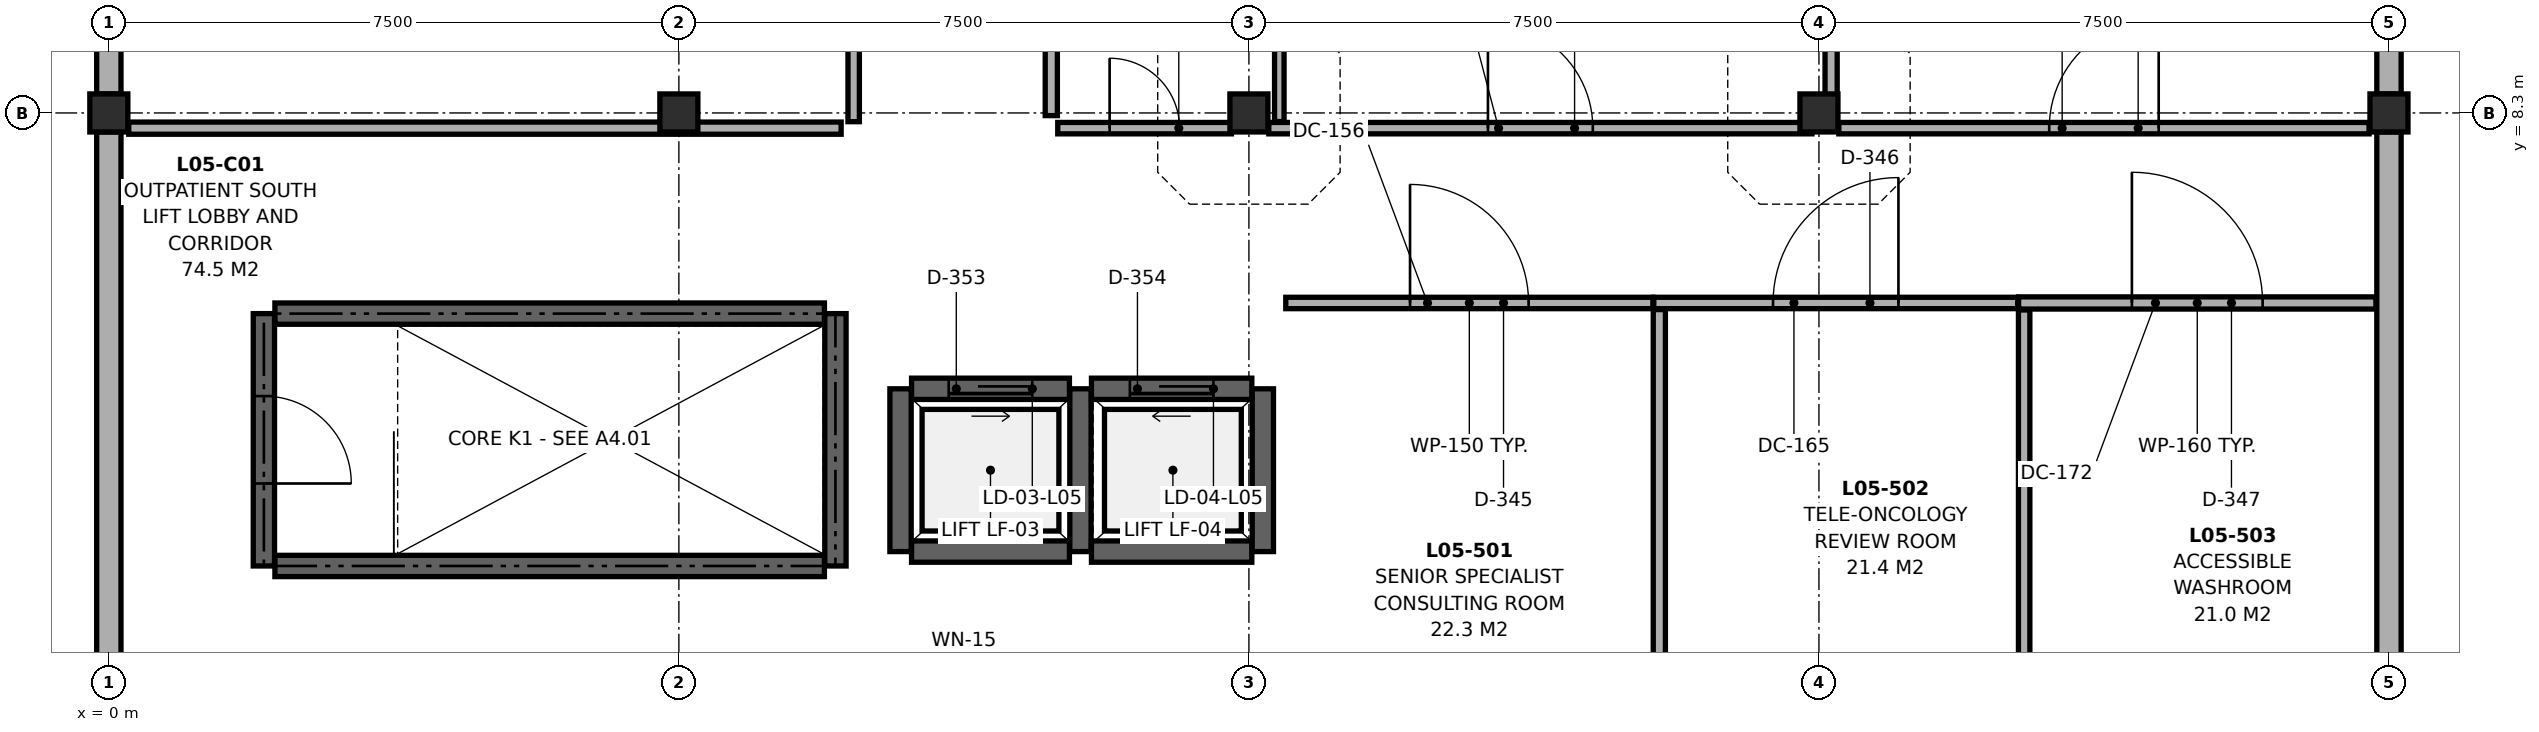
"""IFC4 building model, lengths in metres.
Left out: names, types, materials, properties, quantities, classifications, styles, units other than length and angle.
Written with IfcOpenShell. Run it as: python <this file> out.ifc"""

import sys

from ifc_helpers import new_model, si_unit, direction, frame, frame_2d, origin, origin_2d, place, context, subcontext, project, spatial, rectangle, extrude, element, fill, save


model = new_model("IFC4")
c1 = context("Model", 3, precision=1e-05, world=origin(), true_north=direction((0.0, 1.0)))
c2 = subcontext(c1, "Body", "Model", "MODEL_VIEW")
j1 = project(units=[si_unit("LENGTHUNIT", "METRE"), si_unit("PLANEANGLEUNIT", "RADIAN")], contexts=[c1])
p1 = place(None, origin())
s1 = spatial("IfcSite", under=j1, at=p1, CompositionType="ELEMENT")
p2 = place(p1, origin())
s2 = spatial("IfcBuilding", under=s1, at=p2, CompositionType="ELEMENT")
p3 = place(p2, frame((0.0, 0.0, 21.5)))
s3 = spatial("IfcBuildingStorey", under=s2, at=p3, CompositionType="ELEMENT", Elevation=21.5)
p4 = place(p3, frame((0.0, 8.3, 0.0), z_axis=(0.0, 0.0, 1.0), x_axis=(1.0, 0.0, 0.0)))
e1 = element("IfcColumn", 1, at=p4, inside=s3, PredefinedType="COLUMN", context=c2, shape_type="SweptSolid", body=[
    extrude(rectangle(XDim=0.5, YDim=0.5, at=origin_2d()), origin(), (0.0, 0.0, 1.0), 3.83),
])
p5 = place(p3, frame((7.5, 8.3, 0.0), z_axis=(0.0, 0.0, 1.0), x_axis=(1.0, 0.0, 0.0)))
e2 = element("IfcColumn", 2, at=p5, inside=s3, PredefinedType="COLUMN", context=c2, shape_type="SweptSolid", body=[
    extrude(rectangle(XDim=0.5, YDim=0.5, at=origin_2d()), origin(), (0.0, 0.0, 1.0), 4.08),
])
p6 = place(p3, frame((15.0, 8.3, 0.0), z_axis=(0.0, 0.0, 1.0), x_axis=(1.0, 0.0, 0.0)))
e3 = element("IfcColumn", 3, at=p6, inside=s3, PredefinedType="COLUMN", context=c2, shape_type="SweptSolid", body=[
    extrude(rectangle(XDim=0.5, YDim=0.5, at=origin_2d()), origin(), (0.0, 0.0, 1.0), 4.33),
])
p7 = place(p3, frame((22.5, 8.3, 0.0), z_axis=(0.0, 0.0, 1.0), x_axis=(1.0, 0.0, 0.0)))
e4 = element("IfcColumn", 4, at=p7, inside=s3, PredefinedType="COLUMN", context=c2, shape_type="SweptSolid", body=[
    extrude(rectangle(XDim=0.5, YDim=0.5, at=origin_2d()), origin(), (0.0, 0.0, 1.0), 4.58),
])
p8 = place(p3, frame((30.0, 8.3, 0.0), z_axis=(0.0, 0.0, 1.0), x_axis=(1.0, 0.0, 0.0)))
e5 = element("IfcColumn", 5, at=p8, inside=s3, PredefinedType="COLUMN", context=c2, shape_type="SweptSolid", body=[
    extrude(rectangle(XDim=0.5, YDim=0.5, at=origin_2d()), origin(), (0.0, 0.0, 1.0), 4.83),
])
p9 = place(p3, frame((30.0, 15.55, 0.0), z_axis=(0.0, 0.0, 1.0), x_axis=(0.0, -1.0, 0.0)))
e6 = element("IfcWall", 6, at=p9, inside=s3, PredefinedType="SOLIDWALL", context=c2, shape_type="SweptSolid", body=[
    extrude(rectangle(XDim=7.0, YDim=0.32, at=frame_2d((3.5, 0.0))), origin(), (0.0, 0.0, 1.0), 3.7),
])
p10 = place(p9, frame((2.8, 0.0, 0.9)))
e7 = element("IfcOpeningElement", 7, at=p10, cuts=e6, PredefinedType="OPENING", context=c2, shape_type="SweptSolid", body=[
    extrude(rectangle(XDim=1.4, YDim=1.5, at=frame_2d((0.7, 0.75))), frame((0.0, 0.172, 0.0), z_axis=(0.0, -1.0, 0.0), x_axis=(1.0, 0.0, 0.0)), (0.0, 0.0, 1.0), 0.344),
])
for number, where, z_axis, x_axis in (
    (8, (30.0, 8.05, 0.0), (0.0, 0.0, 1.0), (0.0, -1.0, 0.0)),
    (9, (0.0, 1.05, 0.0), (0.0, 0.0, 1.0), (0.0, 1.0, 0.0)),
    (10, (0.0, 8.55, 0.0), (0.0, 0.0, 1.0), (0.0, 1.0, 0.0)),
):
    element("IfcWall", number, at=place(p3, frame(where, z_axis=z_axis, x_axis=x_axis)), inside=s3, PredefinedType="SOLIDWALL", context=c2, shape_type="SweptSolid", body=[
        extrude(rectangle(XDim=7.0, YDim=0.32, at=frame_2d((3.5, 0.0))), origin(), (0.0, 0.0, 1.0), 3.7),
    ])
p11 = place(p3, frame((2.185, 2.34, 0.0), z_axis=(0.0, 0.0, 1.0), x_axis=(1.0, 0.0, 0.0)))
e11 = element("IfcWall", 11, at=p11, inside=s3, PredefinedType="SHEAR", context=c2, shape_type="SweptSolid", body=[
    extrude(rectangle(XDim=7.23, YDim=0.28, at=frame_2d((3.615, 0.0))), origin(), (0.0, 0.0, 1.0), 3.72),
])
p12 = place(p3, frame((9.56, 2.34, 0.0), z_axis=(0.0, 0.0, 1.0), x_axis=(0.0, 1.0, 0.0)))
e12 = element("IfcWall", 12, at=p12, inside=s3, PredefinedType="SHEAR", context=c2, shape_type="SweptSolid", body=[
    extrude(rectangle(XDim=3.32, YDim=0.28, at=frame_2d((1.66, 0.0))), origin(), (0.0, 0.0, 1.0), 3.72),
])
p13 = place(p3, frame((9.415, 5.66, 0.0), z_axis=(0.0, 0.0, 1.0), x_axis=(-1.0, 0.0, 0.0)))
e13 = element("IfcWall", 13, at=p13, inside=s3, PredefinedType="SHEAR", context=c2, shape_type="SweptSolid", body=[
    extrude(rectangle(XDim=7.23, YDim=0.28, at=frame_2d((3.615, 0.0))), origin(), (0.0, 0.0, 1.0), 3.72),
])
p14 = place(p3, frame((2.04, 5.66, 0.0), z_axis=(0.0, 0.0, 1.0), x_axis=(0.0, -1.0, 0.0)))
e14 = element("IfcWall", 14, at=p14, inside=s3, PredefinedType="SHEAR", context=c2, shape_type="SweptSolid", body=[
    extrude(rectangle(XDim=3.32, YDim=0.28, at=frame_2d((1.66, 0.0))), origin(), (0.0, 0.0, 1.0), 3.72),
])
p15 = place(p14, frame((1.085, 0.0, 0.0)))
e15 = element("IfcOpeningElement", 15, at=p15, cuts=e14, PredefinedType="OPENING", context=c2, shape_type="SweptSolid", body=[
    extrude(rectangle(XDim=1.15, YDim=2.15, at=frame_2d((0.575, 1.075))), frame((0.0, 0.152, 0.0), z_axis=(0.0, -1.0, 0.0), x_axis=(1.0, 0.0, 0.0)), (0.0, 0.0, 1.0), 0.304),
])
p16 = place(p3, frame((10.562, 2.529, 0.0), z_axis=(0.0, 0.0, 1.0), x_axis=(1.0, 0.0, 0.0)))
e16 = element("IfcWall", 16, at=p16, inside=s3, PredefinedType="SHEAR", context=c2, shape_type="SweptSolid", body=[
    extrude(rectangle(XDim=2.077, YDim=0.28, at=frame_2d((1.039, 0.0))), origin(), (0.0, 0.0, 1.0), 5.3),
])
p17 = place(p3, frame((12.783, 2.529, 0.0), z_axis=(0.0, 0.0, 1.0), x_axis=(0.0, 1.0, 0.0)))
e17 = element("IfcWall", 17, at=p17, inside=s3, PredefinedType="SHEAR", context=c2, shape_type="SweptSolid", body=[
    extrude(rectangle(XDim=2.141, YDim=0.28, at=frame_2d((1.071, 0.0))), origin(), (0.0, 0.0, 1.0), 5.3),
])
p18 = place(p3, frame((12.638, 4.671, 0.0), z_axis=(0.0, 0.0, 1.0), x_axis=(-1.0, 0.0, 0.0)))
e18 = element("IfcWall", 18, at=p18, inside=s3, PredefinedType="SHEAR", context=c2, shape_type="SweptSolid", body=[
    extrude(rectangle(XDim=2.077, YDim=0.28, at=frame_2d((1.039, 0.0))), origin(), (0.0, 0.0, 1.0), 5.3),
])
p19 = place(p18, frame((0.489, 0.0, 0.0)))
e19 = element("IfcOpeningElement", 19, at=p19, cuts=e18, PredefinedType="OPENING", context=c2, shape_type="SweptSolid", body=[
    extrude(rectangle(XDim=1.1, YDim=2.15, at=frame_2d((0.55, 1.075))), frame((0.0, 0.152, 0.0), z_axis=(0.0, -1.0, 0.0), x_axis=(1.0, 0.0, 0.0)), (0.0, 0.0, 1.0), 0.304),
])
p20 = place(p3, frame((10.417, 4.671, 0.0), z_axis=(0.0, 0.0, 1.0), x_axis=(0.0, -1.0, 0.0)))
e20 = element("IfcWall", 20, at=p20, inside=s3, PredefinedType="SHEAR", context=c2, shape_type="SweptSolid", body=[
    extrude(rectangle(XDim=2.141, YDim=0.28, at=frame_2d((1.071, 0.0))), origin(), (0.0, 0.0, 1.0), 5.3),
])
p21 = place(p3, frame((12.928, 2.529, 0.0), z_axis=(0.0, 0.0, 1.0), x_axis=(1.0, 0.0, 0.0)))
e21 = element("IfcWall", 21, at=p21, inside=s3, PredefinedType="SHEAR", context=c2, shape_type="SweptSolid", body=[
    extrude(rectangle(XDim=2.11, YDim=0.28, at=frame_2d((1.055, 0.0))), origin(), (0.0, 0.0, 1.0), 5.3),
])
p22 = place(p3, frame((15.184, 2.529, 0.0), z_axis=(0.0, 0.0, 1.0), x_axis=(0.0, 1.0, 0.0)))
e22 = element("IfcWall", 22, at=p22, inside=s3, PredefinedType="SHEAR", context=c2, shape_type="SweptSolid", body=[
    extrude(rectangle(XDim=2.141, YDim=0.28, at=frame_2d((1.071, 0.0))), origin(), (0.0, 0.0, 1.0), 5.3),
])
p23 = place(p3, frame((15.039, 4.671, 0.0), z_axis=(0.0, 0.0, 1.0), x_axis=(-1.0, 0.0, 0.0)))
e23 = element("IfcWall", 23, at=p23, inside=s3, PredefinedType="SHEAR", context=c2, shape_type="SweptSolid", body=[
    extrude(rectangle(XDim=2.11, YDim=0.28, at=frame_2d((1.055, 0.0))), origin(), (0.0, 0.0, 1.0), 5.3),
])
p24 = place(p23, frame((0.505, 0.0, 0.0)))
e24 = element("IfcOpeningElement", 24, at=p24, cuts=e23, PredefinedType="OPENING", context=c2, shape_type="SweptSolid", body=[
    extrude(rectangle(XDim=1.1, YDim=2.15, at=frame_2d((0.55, 1.075))), frame((0.0, 0.152, 0.0), z_axis=(0.0, -1.0, 0.0), x_axis=(1.0, 0.0, 0.0)), (0.0, 0.0, 1.0), 0.304),
])
p25 = place(p3, frame((15.485, 5.8, 0.0), z_axis=(0.0, 0.0, 1.0), x_axis=(1.0, 0.0, 0.0)))
e25 = element("IfcWall", 25, at=p25, inside=s3, PredefinedType="PARTITIONING", context=c2, shape_type="SweptSolid", body=[
    extrude(rectangle(XDim=4.83, YDim=0.15, at=frame_2d((2.415, 0.0))), origin(), (0.0, 0.0, 1.0), 3.7),
])
p26 = place(p25, frame((1.635, 0.0, 0.0)))
e26 = element("IfcOpeningElement", 26, at=p26, cuts=e25, PredefinedType="OPENING", context=c2, shape_type="SweptSolid", body=[
    extrude(rectangle(XDim=1.56, YDim=2.3, at=frame_2d((0.78, 1.15))), frame((0.0, 0.087, 0.0), z_axis=(0.0, -1.0, 0.0), x_axis=(1.0, 0.0, 0.0)), (0.0, 0.0, 1.0), 0.174),
])
p27 = place(p3, frame((20.327, 5.8, 0.0), z_axis=(0.0, 0.0, 1.0), x_axis=(1.0, 0.0, 0.0)))
e27 = element("IfcWall", 27, at=p27, inside=s3, PredefinedType="PARTITIONING", context=c2, shape_type="SweptSolid", body=[
    extrude(rectangle(XDim=4.788, YDim=0.15, at=frame_2d((2.394, 0.0))), origin(), (0.0, 0.0, 1.0), 3.7),
])
p28 = place(p27, frame((1.569, 0.0, 0.0)))
e28 = element("IfcOpeningElement", 28, at=p28, cuts=e27, PredefinedType="OPENING", context=c2, shape_type="SweptSolid", body=[
    extrude(rectangle(XDim=1.65, YDim=2.32, at=frame_2d((0.825, 1.16))), frame((0.0, 0.087, 0.0), z_axis=(0.0, -1.0, 0.0), x_axis=(1.0, 0.0, 0.0)), (0.0, 0.0, 1.0), 0.174),
])
p29 = place(p3, frame((25.127, 5.8, 0.0), z_axis=(0.0, 0.0, 1.0), x_axis=(1.0, 0.0, 0.0)))
e29 = element("IfcWall", 29, at=p29, inside=s3, PredefinedType="PARTITIONING", context=c2, shape_type="SweptSolid", body=[
    extrude(rectangle(XDim=4.701, YDim=0.16, at=frame_2d((2.351, 0.0))), origin(), (0.0, 0.0, 1.0), 3.7),
])
p30 = place(p29, frame((1.49, 0.0, 0.0)))
e30 = element("IfcOpeningElement", 30, at=p30, cuts=e29, PredefinedType="OPENING", context=c2, shape_type="SweptSolid", body=[
    extrude(rectangle(XDim=1.72, YDim=2.34, at=frame_2d((0.86, 1.17))), frame((0.0, 0.092, 0.0), z_axis=(0.0, -1.0, 0.0), x_axis=(1.0, 0.0, 0.0)), (0.0, 0.0, 1.0), 0.184),
])
p31 = place(p3, frame((15.262, 8.1, 0.0), z_axis=(0.0, 0.0, 1.0), x_axis=(1.0, 0.0, 0.0)))
e31 = element("IfcWall", 31, at=p31, inside=s3, PredefinedType="PARTITIONING", context=c2, shape_type="SweptSolid", body=[
    extrude(rectangle(XDim=7.146, YDim=0.15, at=frame_2d((3.573, 0.0))), origin(), (0.0, 0.0, 1.0), 3.7),
])
p32 = place(p31, frame((2.883, 0.0, 0.0)))
e32 = element("IfcOpeningElement", 32, at=p32, cuts=e31, PredefinedType="OPENING", context=c2, shape_type="SweptSolid", body=[
    extrude(rectangle(XDim=1.38, YDim=2.3, at=frame_2d((0.69, 1.15))), frame((0.0, 0.087, 0.0), z_axis=(0.0, -1.0, 0.0), x_axis=(1.0, 0.0, 0.0)), (0.0, 0.0, 1.0), 0.174),
])
p33 = place(p3, frame((22.762, 8.1, 0.0), z_axis=(0.0, 0.0, 1.0), x_axis=(1.0, 0.0, 0.0)))
e33 = element("IfcWall", 33, at=p33, inside=s3, PredefinedType="PARTITIONING", context=c2, shape_type="SweptSolid", body=[
    extrude(rectangle(XDim=6.976, YDim=0.15, at=frame_2d((3.488, 0.0))), origin(), (0.0, 0.0, 1.0), 3.7),
])
p34 = place(p33, frame((2.768, 0.0, 0.0)))
e34 = element("IfcOpeningElement", 34, at=p34, cuts=e33, PredefinedType="OPENING", context=c2, shape_type="SweptSolid", body=[
    extrude(rectangle(XDim=1.44, YDim=2.32, at=frame_2d((0.72, 1.16))), frame((0.0, 0.087, 0.0), z_axis=(0.0, -1.0, 0.0), x_axis=(1.0, 0.0, 0.0)), (0.0, 0.0, 1.0), 0.174),
])
p35 = place(p3, frame((9.8, 8.185, 0.0), z_axis=(0.0, 0.0, 1.0), x_axis=(0.0, 1.0, 0.0)))
e35 = element("IfcWall", 35, at=p35, inside=s3, PredefinedType="PARTITIONING", context=c2, shape_type="SweptSolid", body=[
    extrude(rectangle(XDim=6.93, YDim=0.15, at=frame_2d((3.465, 0.0))), origin(), (0.0, 0.0, 1.0), 3.7),
])
p36 = place(p35, frame((2.865, 0.0, 0.0)))
e36 = element("IfcOpeningElement", 36, at=p36, cuts=e35, PredefinedType="OPENING", context=c2, shape_type="SweptSolid", body=[
    extrude(rectangle(XDim=1.2, YDim=2.15, at=frame_2d((0.6, 1.075))), frame((0.0, 0.087, 0.0), z_axis=(0.0, -1.0, 0.0), x_axis=(1.0, 0.0, 0.0)), (0.0, 0.0, 1.0), 0.174),
])
p37 = place(p3, frame((12.485, 8.1, 0.0), z_axis=(0.0, 0.0, 1.0), x_axis=(1.0, 0.0, 0.0)))
e37 = element("IfcWall", 37, at=p37, inside=s3, PredefinedType="PARTITIONING", context=c2, shape_type="SweptSolid", body=[
    extrude(rectangle(XDim=2.285, YDim=0.15, at=frame_2d((1.143, 0.0))), origin(), (0.0, 0.0, 1.0), 3.7),
])
p38 = place(p37, frame((0.683, 0.0, 0.0)))
e38 = element("IfcOpeningElement", 38, at=p38, cuts=e37, PredefinedType="OPENING", context=c2, shape_type="SweptSolid", body=[
    extrude(rectangle(XDim=0.92, YDim=2.1, at=frame_2d((0.46, 1.05))), frame((0.0, 0.087, 0.0), z_axis=(0.0, -1.0, 0.0), x_axis=(1.0, 0.0, 0.0)), (0.0, 0.0, 1.0), 0.174),
])
p39 = place(p3, frame((20.4, 0.972, 0.0), z_axis=(0.0, 0.0, 1.0), x_axis=(0.0, 1.0, 0.0)))
e39 = element("IfcWall", 39, at=p39, inside=s3, PredefinedType="PARTITIONING", context=c2, shape_type="SweptSolid", body=[
    extrude(rectangle(XDim=4.741, YDim=0.16, at=frame_2d((2.371, 0.0))), origin(), (0.0, 0.0, 1.0), 3.7),
])
p40 = place(p3, frame((25.2, 0.972, 0.0), z_axis=(0.0, 0.0, 1.0), x_axis=(0.0, 1.0, 0.0)))
e40 = element("IfcWall", 40, at=p40, inside=s3, PredefinedType="PARTITIONING", context=c2, shape_type="SweptSolid", body=[
    extrude(rectangle(XDim=4.736, YDim=0.15, at=frame_2d((2.368, 0.0))), origin(), (0.0, 0.0, 1.0), 3.7),
])
p41 = place(p3, frame((15.4, 8.187, 0.0), z_axis=(0.0, 0.0, 1.0), x_axis=(0.0, 1.0, 0.0)))
e41 = element("IfcWall", 41, at=p41, inside=s3, PredefinedType="PARTITIONING", context=c2, shape_type="SweptSolid", body=[
    extrude(rectangle(XDim=7.441, YDim=0.125, at=frame_2d((3.72, 0.0))), origin(), (0.0, 0.0, 1.0), 3.7),
])
p42 = place(p3, frame((22.66, 8.432, 0.0), z_axis=(0.0, 0.0, 1.0), x_axis=(0.0, 1.0, 0.0)))
e42 = element("IfcWall", 42, at=p42, inside=s3, PredefinedType="PARTITIONING", context=c2, shape_type="SweptSolid", body=[
    extrude(rectangle(XDim=7.106, YDim=0.16, at=frame_2d((3.553, 0.0))), origin(), (0.0, 0.0, 1.0), 3.7),
])
p43 = place(p3, frame((0.262, 8.1, 0.0), z_axis=(0.0, 0.0, 1.0), x_axis=(1.0, 0.0, 0.0)))
e43 = element("IfcWall", 43, at=p43, inside=s3, PredefinedType="PARTITIONING", context=c2, shape_type="SweptSolid", body=[
    extrude(rectangle(XDim=9.373, YDim=0.16, at=frame_2d((4.687, 0.0))), origin(), (0.0, 0.0, 1.0), 3.7),
])
p44 = place(p3, frame((12.4, 8.265, 0.0), z_axis=(0.0, 0.0, 1.0), x_axis=(0.0, 1.0, 0.0)))
e44 = element("IfcWall", 44, at=p44, inside=s3, PredefinedType="PARTITIONING", context=c2, shape_type="SweptSolid", body=[
    extrude(rectangle(XDim=7.17, YDim=0.16, at=frame_2d((3.585, 0.0))), origin(), (0.0, 0.0, 1.0), 3.7),
])
p45 = place(p15, origin())
e45 = element("IfcDoor", 45, at=p45, inside=s3, OperationType="SINGLE_SWING_RIGHT", PredefinedType="DOOR", context=c2, shape_type="SweptSolid", body=[
    extrude(rectangle(XDim=1.15, YDim=2.15, at=frame_2d((0.575, 1.075))), frame((0.0, 0.025, 0.0), z_axis=(0.0, -1.0, 0.0), x_axis=(1.0, 0.0, 0.0)), (0.0, 0.0, 1.0), 0.05),
])
fill(e15, e45)
p46 = place(p19, origin())
e46 = element("IfcDoor", 46, at=p46, inside=s3, OperationType="SLIDING_TO_LEFT", PredefinedType="DOOR", context=c2, shape_type="SweptSolid", body=[
    extrude(rectangle(XDim=1.1, YDim=2.15, at=frame_2d((0.55, 1.075))), frame((0.0, 0.025, 0.0), z_axis=(0.0, -1.0, 0.0), x_axis=(1.0, 0.0, 0.0)), (0.0, 0.0, 1.0), 0.05),
])
fill(e19, e46)
p47 = place(p24, origin())
e47 = element("IfcDoor", 47, at=p47, inside=s3, OperationType="SLIDING_TO_RIGHT", PredefinedType="DOOR", context=c2, shape_type="SweptSolid", body=[
    extrude(rectangle(XDim=1.1, YDim=2.15, at=frame_2d((0.55, 1.075))), frame((0.0, 0.025, 0.0), z_axis=(0.0, -1.0, 0.0), x_axis=(1.0, 0.0, 0.0)), (0.0, 0.0, 1.0), 0.05),
])
fill(e24, e47)
p48 = place(p26, origin())
e48 = element("IfcDoor", 48, at=p48, inside=s3, OperationType="SINGLE_SWING_LEFT", PredefinedType="DOOR", context=c2, shape_type="SweptSolid", body=[
    extrude(rectangle(XDim=1.56, YDim=2.3, at=frame_2d((0.78, 1.15))), frame((0.0, 0.025, 0.0), z_axis=(0.0, -1.0, 0.0), x_axis=(1.0, 0.0, 0.0)), (0.0, 0.0, 1.0), 0.05),
])
fill(e26, e48)
p49 = place(p28, origin())
e49 = element("IfcDoor", 49, at=p49, inside=s3, OperationType="SINGLE_SWING_RIGHT", PredefinedType="DOOR", context=c2, shape_type="SweptSolid", body=[
    extrude(rectangle(XDim=1.65, YDim=2.32, at=frame_2d((0.825, 1.16))), frame((0.0, 0.025, 0.0), z_axis=(0.0, -1.0, 0.0), x_axis=(1.0, 0.0, 0.0)), (0.0, 0.0, 1.0), 0.05),
])
fill(e28, e49)
p50 = place(p30, origin())
e50 = element("IfcDoor", 50, at=p50, inside=s3, OperationType="SINGLE_SWING_LEFT", PredefinedType="DOOR", context=c2, shape_type="SweptSolid", body=[
    extrude(rectangle(XDim=1.72, YDim=2.34, at=frame_2d((0.86, 1.17))), frame((0.0, 0.025, 0.0), z_axis=(0.0, -1.0, 0.0), x_axis=(1.0, 0.0, 0.0)), (0.0, 0.0, 1.0), 0.05),
])
fill(e30, e50)
p51 = place(p32, origin())
e51 = element("IfcDoor", 51, at=p51, inside=s3, OperationType="SINGLE_SWING_LEFT", PredefinedType="DOOR", context=c2, shape_type="SweptSolid", body=[
    extrude(rectangle(XDim=1.38, YDim=2.3, at=frame_2d((0.69, 1.15))), frame((0.0, 0.025, 0.0), z_axis=(0.0, -1.0, 0.0), x_axis=(1.0, 0.0, 0.0)), (0.0, 0.0, 1.0), 0.05),
])
fill(e32, e51)
p52 = place(p34, origin())
e52 = element("IfcDoor", 52, at=p52, inside=s3, OperationType="SINGLE_SWING_RIGHT", PredefinedType="DOOR", context=c2, shape_type="SweptSolid", body=[
    extrude(rectangle(XDim=1.44, YDim=2.32, at=frame_2d((0.72, 1.16))), frame((0.0, 0.025, 0.0), z_axis=(0.0, -1.0, 0.0), x_axis=(1.0, 0.0, 0.0)), (0.0, 0.0, 1.0), 0.05),
])
fill(e34, e52)
p53 = place(p38, origin())
e53 = element("IfcDoor", 53, at=p53, inside=s3, OperationType="SINGLE_SWING_LEFT", PredefinedType="DOOR", context=c2, shape_type="SweptSolid", body=[
    extrude(rectangle(XDim=0.92, YDim=2.1, at=frame_2d((0.46, 1.05))), frame((0.0, 0.025, 0.0), z_axis=(0.0, -1.0, 0.0), x_axis=(1.0, 0.0, 0.0)), (0.0, 0.0, 1.0), 0.05),
])
fill(e38, e53)
save(model, sys.argv[1])
